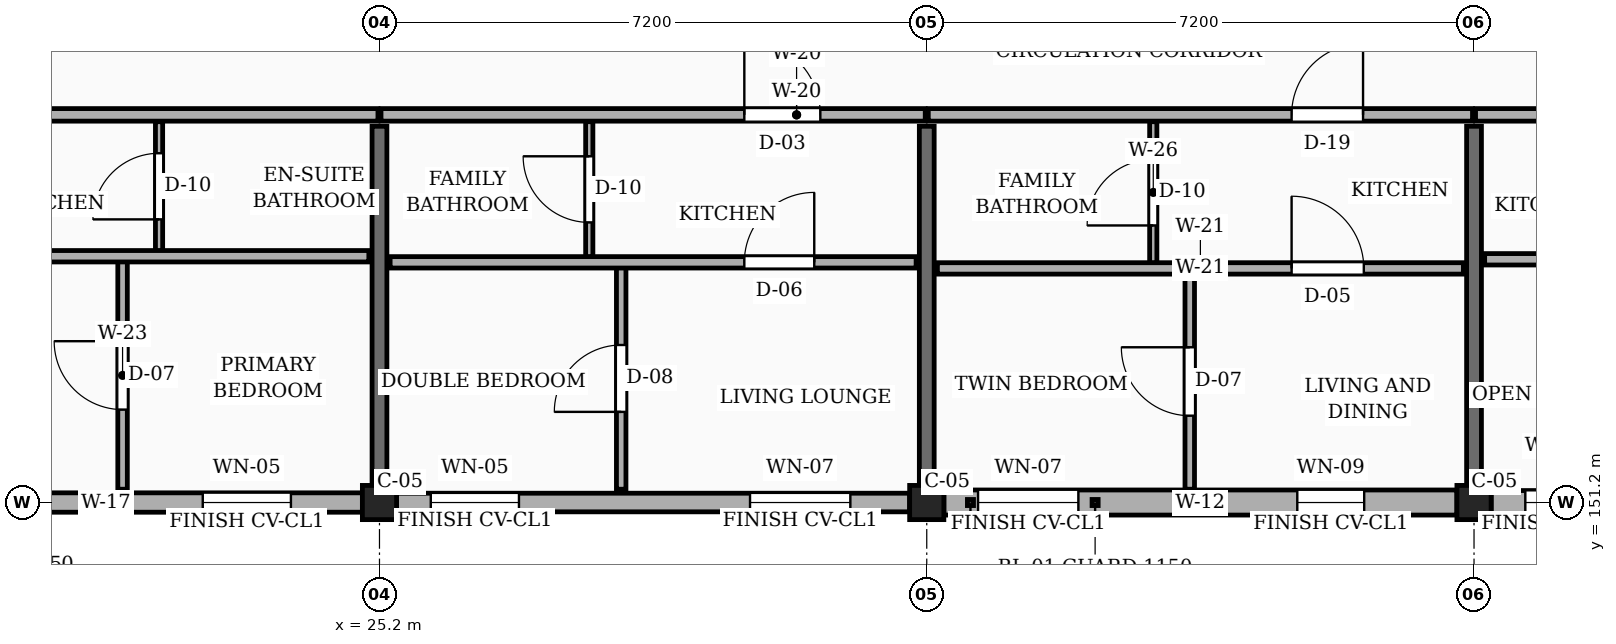
"""IFC4 building model, lengths in metres.
Left out: names, types, materials, properties, quantities, classifications, styles, units other than length and angle.
Written with IfcOpenShell. Run it as: python <this file> out.ifc"""

import sys

from ifc_helpers import new_model, si_unit, direction, frame, frame_2d, origin, origin_2d, place, context, subcontext, project, spatial, rectangle, extrude, element, fill, save


model = new_model("IFC4")
c1 = context("Model", 3, precision=1e-05, world=origin(), true_north=direction((0.0, 1.0)))
c2 = subcontext(c1, "Body", "Model", "MODEL_VIEW")
j1 = project(units=[si_unit("LENGTHUNIT", "METRE"), si_unit("PLANEANGLEUNIT", "RADIAN")], contexts=[c1])
p1 = place(None, origin())
s1 = spatial("IfcSite", under=j1, at=p1, CompositionType="ELEMENT")
p2 = place(p1, origin())
s2 = spatial("IfcBuilding", under=s1, at=p2, CompositionType="ELEMENT")
p3 = place(p2, frame((0.0, 0.0, 39.15)))
s3 = spatial("IfcBuildingStorey", under=s2, at=p3, CompositionType="ELEMENT", Elevation=39.15)
for number, where, z_axis, x_axis in (
    (1, (25.2, 151.2, 0.0), (0.0, 0.0, 1.0), (1.0, 0.0, 0.0)),
    (2, (32.4, 151.2, 0.0), (0.0, 0.0, 1.0), (1.0, 0.0, 0.0)),
    (3, (39.6, 151.2, 0.0), (0.0, 0.0, 1.0), (1.0, 0.0, 0.0)),
):
    element("IfcColumn", number, at=place(p3, frame(where, z_axis=z_axis, x_axis=x_axis)), inside=s3, PredefinedType="COLUMN", context=c2, shape_type="SweptSolid", body=[
        extrude(rectangle(XDim=0.45, YDim=0.45, at=origin_2d()), origin(), (0.0, 0.0, 1.0), 3.15),
    ])
for number, where, z_axis, x_axis in (
    (4, (25.2, 151.425, 0.0), (0.0, 0.0, 1.0), (0.0, 1.0, 0.0)),
    (5, (32.4, 151.425, 0.0), (0.0, 0.0, 1.0), (0.0, 1.0, 0.0)),
    (6, (39.6, 151.425, 0.0), (0.0, 0.0, 1.0), (0.0, 1.0, 0.0)),
):
    element("IfcWall", number, at=place(p3, frame(where, z_axis=z_axis, x_axis=x_axis)), inside=s3, PredefinedType="SOLIDWALL", context=c2, shape_type="SweptSolid", body=[
        extrude(rectangle(XDim=4.725, YDim=0.195, at=frame_2d((2.362, 0.0))), origin(), (0.0, 0.0, 1.0), 2.185),
    ])
p4 = place(p3, frame((18.225, 151.2, 0.0), z_axis=(0.0, 0.0, 1.0), x_axis=(1.0, 0.0, 0.0)))
e7 = element("IfcWall", 7, at=p4, inside=s3, PredefinedType="SOLIDWALL", context=c2, shape_type="SweptSolid", body=[
    extrude(rectangle(XDim=6.75, YDim=0.255, at=frame_2d((3.375, 0.0))), origin(), (0.0, 0.0, 1.0), 2.455),
])
p5 = place(p4, frame((0.45, 0.0, 0.78)))
e8 = element("IfcOpeningElement", 8, at=p5, cuts=e7, PredefinedType="OPENING", context=c2, shape_type="SweptSolid", body=[
    extrude(rectangle(XDim=1.0, YDim=1.15, at=frame_2d((0.5, 0.575))), frame((0.0, 0.137, 0.0), z_axis=(0.0, -1.0, 0.0), x_axis=(1.0, 0.0, 0.0)), (0.0, 0.0, 1.0), 0.275),
])
p6 = place(p4, frame((4.65, 0.0, 0.78)))
e9 = element("IfcOpeningElement", 9, at=p6, cuts=e7, PredefinedType="OPENING", context=c2, shape_type="SweptSolid", body=[
    extrude(rectangle(XDim=1.16, YDim=1.15, at=frame_2d((0.58, 0.575))), frame((0.0, 0.137, 0.0), z_axis=(0.0, -1.0, 0.0), x_axis=(1.0, 0.0, 0.0)), (0.0, 0.0, 1.0), 0.275),
])
p7 = place(p3, frame((25.425, 151.2, 0.0), z_axis=(0.0, 0.0, 1.0), x_axis=(1.0, 0.0, 0.0)))
e10 = element("IfcWall", 10, at=p7, inside=s3, PredefinedType="SOLIDWALL", context=c2, shape_type="SweptSolid", body=[
    extrude(rectangle(XDim=6.75, YDim=0.245, at=frame_2d((3.375, 0.0))), origin(), (0.0, 0.0, 1.0), 2.455),
])
p8 = place(p7, frame((0.45, 0.0, 0.78)))
e11 = element("IfcOpeningElement", 11, at=p8, cuts=e10, PredefinedType="OPENING", context=c2, shape_type="SweptSolid", body=[
    extrude(rectangle(XDim=1.16, YDim=1.15, at=frame_2d((0.58, 0.575))), frame((0.0, 0.133, 0.0), z_axis=(0.0, -1.0, 0.0), x_axis=(1.0, 0.0, 0.0)), (0.0, 0.0, 1.0), 0.265),
])
p9 = place(p7, frame((4.65, 0.0, 0.78)))
e12 = element("IfcOpeningElement", 12, at=p9, cuts=e10, PredefinedType="OPENING", context=c2, shape_type="SweptSolid", body=[
    extrude(rectangle(XDim=1.32, YDim=1.15, at=frame_2d((0.66, 0.575))), frame((0.0, 0.133, 0.0), z_axis=(0.0, -1.0, 0.0), x_axis=(1.0, 0.0, 0.0)), (0.0, 0.0, 1.0), 0.265),
])
p10 = place(p3, frame((32.625, 151.2, 0.0), z_axis=(0.0, 0.0, 1.0), x_axis=(1.0, 0.0, 0.0)))
e13 = element("IfcWall", 13, at=p10, inside=s3, PredefinedType="SOLIDWALL", context=c2, shape_type="SweptSolid", body=[
    extrude(rectangle(XDim=6.75, YDim=0.33, at=frame_2d((3.375, 0.0))), origin(), (0.0, 0.0, 1.0), 2.455),
])
p11 = place(p10, frame((0.45, 0.0, 0.78)))
e14 = element("IfcOpeningElement", 14, at=p11, cuts=e13, PredefinedType="OPENING", context=c2, shape_type="SweptSolid", body=[
    extrude(rectangle(XDim=1.32, YDim=1.15, at=frame_2d((0.66, 0.575))), frame((0.0, 0.175, 0.0), z_axis=(0.0, -1.0, 0.0), x_axis=(1.0, 0.0, 0.0)), (0.0, 0.0, 1.0), 0.35),
])
p12 = place(p10, frame((4.65, 0.0, 0.78)))
e15 = element("IfcOpeningElement", 15, at=p12, cuts=e13, PredefinedType="OPENING", context=c2, shape_type="SweptSolid", body=[
    extrude(rectangle(XDim=0.88, YDim=1.26, at=frame_2d((0.44, 0.63))), frame((0.0, 0.175, 0.0), z_axis=(0.0, -1.0, 0.0), x_axis=(1.0, 0.0, 0.0)), (0.0, 0.0, 1.0), 0.35),
])
p13 = place(p3, frame((39.825, 151.2, 0.0), z_axis=(0.0, 0.0, 1.0), x_axis=(1.0, 0.0, 0.0)))
e16 = element("IfcWall", 16, at=p13, inside=s3, PredefinedType="SOLIDWALL", context=c2, shape_type="SweptSolid", body=[
    extrude(rectangle(XDim=6.75, YDim=0.315, at=frame_2d((3.375, 0.0))), origin(), (0.0, 0.0, 1.0), 2.455),
])
p14 = place(p13, frame((0.45, 0.0, 0.78)))
e17 = element("IfcOpeningElement", 17, at=p14, cuts=e16, PredefinedType="OPENING", context=c2, shape_type="SweptSolid", body=[
    extrude(rectangle(XDim=0.88, YDim=1.26, at=frame_2d((0.44, 0.63))), frame((0.0, 0.167, 0.0), z_axis=(0.0, -1.0, 0.0), x_axis=(1.0, 0.0, 0.0)), (0.0, 0.0, 1.0), 0.335),
])
p15 = place(p13, frame((4.65, 0.0, 0.78)))
e18 = element("IfcOpeningElement", 18, at=p15, cuts=e16, PredefinedType="OPENING", context=c2, shape_type="SweptSolid", body=[
    extrude(rectangle(XDim=1.04, YDim=1.26, at=frame_2d((0.52, 0.63))), frame((0.0, 0.167, 0.0), z_axis=(0.0, -1.0, 0.0), x_axis=(1.0, 0.0, 0.0)), (0.0, 0.0, 1.0), 0.335),
])
p16 = place(p3, frame((18.175, 156.3, 0.0), z_axis=(0.0, 0.0, 1.0), x_axis=(1.0, 0.0, 0.0)))
e19 = element("IfcWall", 19, at=p16, inside=s3, PredefinedType="PARTITIONING", context=c2, shape_type="SweptSolid", body=[
    extrude(rectangle(XDim=7.005, YDim=0.165, at=frame_2d((3.502, 0.0))), origin(), (0.0, 0.0, 1.0), 2.32),
])
p17 = place(p16, frame((1.175, 0.0, 0.0)))
e20 = element("IfcOpeningElement", 20, at=p17, cuts=e19, PredefinedType="OPENING", context=c2, shape_type="SweptSolid", body=[
    extrude(rectangle(XDim=1.14, YDim=2.18, at=frame_2d((0.57, 1.09))), frame((0.0, 0.093, 0.0), z_axis=(0.0, -1.0, 0.0), x_axis=(1.0, 0.0, 0.0)), (0.0, 0.0, 1.0), 0.185),
])
p18 = place(p3, frame((25.22, 156.3, 0.0), z_axis=(0.0, 0.0, 1.0), x_axis=(1.0, 0.0, 0.0)))
e21 = element("IfcWall", 21, at=p18, inside=s3, PredefinedType="PARTITIONING", context=c2, shape_type="SweptSolid", body=[
    extrude(rectangle(XDim=7.16, YDim=0.165, at=frame_2d((3.58, 0.0))), origin(), (0.0, 0.0, 1.0), 2.32),
])
p19 = place(p18, frame((4.78, 0.0, 0.0)))
e22 = element("IfcOpeningElement", 22, at=p19, cuts=e21, PredefinedType="OPENING", context=c2, shape_type="SweptSolid", body=[
    extrude(rectangle(XDim=1.0, YDim=2.15, at=frame_2d((0.5, 1.075))), frame((0.0, 0.093, 0.0), z_axis=(0.0, -1.0, 0.0), x_axis=(1.0, 0.0, 0.0)), (0.0, 0.0, 1.0), 0.185),
])
p20 = place(p3, frame((32.42, 156.3, 0.0), z_axis=(0.0, 0.0, 1.0), x_axis=(1.0, 0.0, 0.0)))
e23 = element("IfcWall", 23, at=p20, inside=s3, PredefinedType="PARTITIONING", context=c2, shape_type="SweptSolid", body=[
    extrude(rectangle(XDim=7.16, YDim=0.165, at=frame_2d((3.58, 0.0))), origin(), (0.0, 0.0, 1.0), 2.32),
])
p21 = place(p20, frame((4.78, 0.0, 0.0)))
e24 = element("IfcOpeningElement", 24, at=p21, cuts=e23, PredefinedType="OPENING", context=c2, shape_type="SweptSolid", body=[
    extrude(rectangle(XDim=0.94, YDim=2.12, at=frame_2d((0.47, 1.06))), frame((0.0, 0.093, 0.0), z_axis=(0.0, -1.0, 0.0), x_axis=(1.0, 0.0, 0.0)), (0.0, 0.0, 1.0), 0.185),
])
p22 = place(p3, frame((39.62, 156.3, 0.0), z_axis=(0.0, 0.0, 1.0), x_axis=(1.0, 0.0, 0.0)))
e25 = element("IfcWall", 25, at=p22, inside=s3, PredefinedType="PARTITIONING", context=c2, shape_type="SweptSolid", body=[
    extrude(rectangle(XDim=7.16, YDim=0.165, at=frame_2d((3.58, 0.0))), origin(), (0.0, 0.0, 1.0), 2.32),
])
p23 = place(p22, frame((1.33, 0.0, 0.0)))
e26 = element("IfcOpeningElement", 26, at=p23, cuts=e25, PredefinedType="OPENING", context=c2, shape_type="SweptSolid", body=[
    extrude(rectangle(XDim=1.14, YDim=2.18, at=frame_2d((0.57, 1.09))), frame((0.0, 0.093, 0.0), z_axis=(0.0, -1.0, 0.0), x_axis=(1.0, 0.0, 0.0)), (0.0, 0.0, 1.0), 0.185),
])
p24 = place(p3, frame((21.82, 151.375, 0.0), z_axis=(0.0, 0.0, 1.0), x_axis=(0.0, 1.0, 0.0)))
e27 = element("IfcWall", 27, at=p24, inside=s3, PredefinedType="PARTITIONING", context=c2, shape_type="SweptSolid", body=[
    extrude(rectangle(XDim=2.995, YDim=0.125, at=frame_2d((1.498, 0.0))), origin(), (0.0, 0.0, 1.0), 2.32),
])
p25 = place(p24, frame((1.048, 0.0, 0.0)))
e28 = element("IfcOpeningElement", 28, at=p25, cuts=e27, PredefinedType="OPENING", context=c2, shape_type="SweptSolid", body=[
    extrude(rectangle(XDim=0.9, YDim=2.1, at=frame_2d((0.45, 1.05))), frame((0.0, 0.073, 0.0), z_axis=(0.0, -1.0, 0.0), x_axis=(1.0, 0.0, 0.0)), (0.0, 0.0, 1.0), 0.145),
])
p26 = place(p3, frame((22.3, 154.51, 0.0), z_axis=(0.0, 0.0, 1.0), x_axis=(0.0, 1.0, 0.0)))
e29 = element("IfcWall", 29, at=p26, inside=s3, PredefinedType="PARTITIONING", context=c2, shape_type="SweptSolid", body=[
    extrude(rectangle(XDim=1.7, YDim=0.095, at=frame_2d((0.85, 0.0))), origin(), (0.0, 0.0, 1.0), 2.32),
])
p27 = place(p26, frame((0.415, 0.0, 0.0)))
e30 = element("IfcOpeningElement", 30, at=p27, cuts=e29, PredefinedType="OPENING", context=c2, shape_type="SweptSolid", body=[
    extrude(rectangle(XDim=0.87, YDim=2.05, at=frame_2d((0.435, 1.025))), frame((0.0, 0.058, 0.0), z_axis=(0.0, -1.0, 0.0), x_axis=(1.0, 0.0, 0.0)), (0.0, 0.0, 1.0), 0.115),
])
p28 = place(p3, frame((18.175, 154.44, 0.0), z_axis=(0.0, 0.0, 1.0), x_axis=(1.0, 0.0, 0.0)))
e31 = element("IfcWall", 31, at=p28, inside=s3, PredefinedType="PARTITIONING", context=c2, shape_type="SweptSolid", body=[
    extrude(rectangle(XDim=6.885, YDim=0.15, at=frame_2d((3.442, 0.0))), origin(), (0.0, 0.0, 1.0), 2.32),
])
p29 = place(p28, frame((1.275, 0.0, 0.0)))
e32 = element("IfcOpeningElement", 32, at=p29, cuts=e31, PredefinedType="OPENING", context=c2, shape_type="SweptSolid", body=[
    extrude(rectangle(XDim=0.95, YDim=2.1, at=frame_2d((0.475, 1.05))), frame((0.0, 0.085, 0.0), z_axis=(0.0, -1.0, 0.0), x_axis=(1.0, 0.0, 0.0)), (0.0, 0.0, 1.0), 0.17),
])
p30 = place(p3, frame((28.38, 151.375, 0.0), z_axis=(0.0, 0.0, 1.0), x_axis=(0.0, 1.0, 0.0)))
e33 = element("IfcWall", 33, at=p30, inside=s3, PredefinedType="PARTITIONING", context=c2, shape_type="SweptSolid", body=[
    extrude(rectangle(XDim=2.915, YDim=0.125, at=frame_2d((1.458, 0.0))), origin(), (0.0, 0.0, 1.0), 2.32),
])
p31 = place(p30, frame((1.018, 0.0, 0.0)))
e34 = element("IfcOpeningElement", 34, at=p31, cuts=e33, PredefinedType="OPENING", context=c2, shape_type="SweptSolid", body=[
    extrude(rectangle(XDim=0.88, YDim=2.08, at=frame_2d((0.44, 1.04))), frame((0.0, 0.073, 0.0), z_axis=(0.0, -1.0, 0.0), x_axis=(1.0, 0.0, 0.0)), (0.0, 0.0, 1.0), 0.145),
])
p32 = place(p3, frame((27.96, 154.43, 0.0), z_axis=(0.0, 0.0, 1.0), x_axis=(0.0, 1.0, 0.0)))
e35 = element("IfcWall", 35, at=p32, inside=s3, PredefinedType="PARTITIONING", context=c2, shape_type="SweptSolid", body=[
    extrude(rectangle(XDim=1.78, YDim=0.095, at=frame_2d((0.89, 0.0))), origin(), (0.0, 0.0, 1.0), 2.32),
])
p33 = place(p32, frame((0.455, 0.0, 0.0)))
e36 = element("IfcOpeningElement", 36, at=p33, cuts=e35, PredefinedType="OPENING", context=c2, shape_type="SweptSolid", body=[
    extrude(rectangle(XDim=0.87, YDim=2.05, at=frame_2d((0.435, 1.025))), frame((0.0, 0.058, 0.0), z_axis=(0.0, -1.0, 0.0), x_axis=(1.0, 0.0, 0.0)), (0.0, 0.0, 1.0), 0.115),
])
p34 = place(p3, frame((25.34, 154.36, 0.0), z_axis=(0.0, 0.0, 1.0), x_axis=(1.0, 0.0, 0.0)))
e37 = element("IfcWall", 37, at=p34, inside=s3, PredefinedType="PARTITIONING", context=c2, shape_type="SweptSolid", body=[
    extrude(rectangle(XDim=6.92, YDim=0.15, at=frame_2d((3.46, 0.0))), origin(), (0.0, 0.0, 1.0), 2.32),
])
p35 = place(p34, frame((4.66, 0.0, 0.0)))
e38 = element("IfcOpeningElement", 38, at=p35, cuts=e37, PredefinedType="OPENING", context=c2, shape_type="SweptSolid", body=[
    extrude(rectangle(XDim=0.92, YDim=2.1, at=frame_2d((0.46, 1.05))), frame((0.0, 0.085, 0.0), z_axis=(0.0, -1.0, 0.0), x_axis=(1.0, 0.0, 0.0)), (0.0, 0.0, 1.0), 0.17),
])
p36 = place(p3, frame((35.86, 151.375, 0.0), z_axis=(0.0, 0.0, 1.0), x_axis=(0.0, 1.0, 0.0)))
e39 = element("IfcWall", 39, at=p36, inside=s3, PredefinedType="PARTITIONING", context=c2, shape_type="SweptSolid", body=[
    extrude(rectangle(XDim=2.835, YDim=0.125, at=frame_2d((1.417, 0.0))), origin(), (0.0, 0.0, 1.0), 2.32),
])
p37 = place(p36, frame((0.968, 0.0, 0.0)))
e40 = element("IfcOpeningElement", 40, at=p37, cuts=e39, PredefinedType="OPENING", context=c2, shape_type="SweptSolid", body=[
    extrude(rectangle(XDim=0.9, YDim=2.1, at=frame_2d((0.45, 1.05))), frame((0.0, 0.073, 0.0), z_axis=(0.0, -1.0, 0.0), x_axis=(1.0, 0.0, 0.0)), (0.0, 0.0, 1.0), 0.145),
])
p38 = place(p3, frame((35.38, 154.35, 0.0), z_axis=(0.0, 0.0, 1.0), x_axis=(0.0, 1.0, 0.0)))
e41 = element("IfcWall", 41, at=p38, inside=s3, PredefinedType="PARTITIONING", context=c2, shape_type="SweptSolid", body=[
    extrude(rectangle(XDim=1.86, YDim=0.095, at=frame_2d((0.93, 0.0))), origin(), (0.0, 0.0, 1.0), 2.32),
])
p39 = place(p38, frame((0.495, 0.0, 0.0)))
e42 = element("IfcOpeningElement", 42, at=p39, cuts=e41, PredefinedType="OPENING", context=c2, shape_type="SweptSolid", body=[
    extrude(rectangle(XDim=0.87, YDim=2.05, at=frame_2d((0.435, 1.025))), frame((0.0, 0.058, 0.0), z_axis=(0.0, -1.0, 0.0), x_axis=(1.0, 0.0, 0.0)), (0.0, 0.0, 1.0), 0.115),
])
p40 = place(p3, frame((32.54, 154.28, 0.0), z_axis=(0.0, 0.0, 1.0), x_axis=(1.0, 0.0, 0.0)))
e43 = element("IfcWall", 43, at=p40, inside=s3, PredefinedType="PARTITIONING", context=c2, shape_type="SweptSolid", body=[
    extrude(rectangle(XDim=6.92, YDim=0.15, at=frame_2d((3.46, 0.0))), origin(), (0.0, 0.0, 1.0), 2.32),
])
p41 = place(p40, frame((4.66, 0.0, 0.0)))
e44 = element("IfcOpeningElement", 44, at=p41, cuts=e43, PredefinedType="OPENING", context=c2, shape_type="SweptSolid", body=[
    extrude(rectangle(XDim=0.95, YDim=2.1, at=frame_2d((0.475, 1.05))), frame((0.0, 0.085, 0.0), z_axis=(0.0, -1.0, 0.0), x_axis=(1.0, 0.0, 0.0)), (0.0, 0.0, 1.0), 0.17),
])
p42 = place(p3, frame((39.74, 154.4, 0.0), z_axis=(0.0, 0.0, 1.0), x_axis=(1.0, 0.0, 0.0)))
e45 = element("IfcWall", 45, at=p42, inside=s3, PredefinedType="PARTITIONING", context=c2, shape_type="SweptSolid", body=[
    extrude(rectangle(XDim=6.92, YDim=0.15, at=frame_2d((3.46, 0.0))), origin(), (0.0, 0.0, 1.0), 2.32),
])
p43 = place(p42, frame((1.31, 0.0, 0.0)))
e46 = element("IfcOpeningElement", 46, at=p43, cuts=e45, PredefinedType="OPENING", context=c2, shape_type="SweptSolid", body=[
    extrude(rectangle(XDim=0.92, YDim=2.1, at=frame_2d((0.46, 1.05))), frame((0.0, 0.085, 0.0), z_axis=(0.0, -1.0, 0.0), x_axis=(1.0, 0.0, 0.0)), (0.0, 0.0, 1.0), 0.17),
])
p44 = place(p6, origin())
e47 = element("IfcWindow", 47, at=p44, inside=s3, PartitioningType="SINGLE_PANEL", PredefinedType="WINDOW", context=c2, shape_type="SweptSolid", body=[
    extrude(rectangle(XDim=1.16, YDim=1.15, at=frame_2d((0.58, 0.575))), frame((0.0, 0.03, 0.0), z_axis=(0.0, -1.0, 0.0), x_axis=(1.0, 0.0, 0.0)), (0.0, 0.0, 1.0), 0.06),
])
fill(e9, e47)
p45 = place(p8, origin())
e48 = element("IfcWindow", 48, at=p45, inside=s3, PartitioningType="SINGLE_PANEL", PredefinedType="WINDOW", context=c2, shape_type="SweptSolid", body=[
    extrude(rectangle(XDim=1.16, YDim=1.15, at=frame_2d((0.58, 0.575))), frame((0.0, 0.03, 0.0), z_axis=(0.0, -1.0, 0.0), x_axis=(1.0, 0.0, 0.0)), (0.0, 0.0, 1.0), 0.06),
])
fill(e11, e48)
p46 = place(p9, origin())
e49 = element("IfcWindow", 49, at=p46, inside=s3, PartitioningType="SINGLE_PANEL", PredefinedType="WINDOW", context=c2, shape_type="SweptSolid", body=[
    extrude(rectangle(XDim=1.32, YDim=1.15, at=frame_2d((0.66, 0.575))), frame((0.0, 0.03, 0.0), z_axis=(0.0, -1.0, 0.0), x_axis=(1.0, 0.0, 0.0)), (0.0, 0.0, 1.0), 0.06),
])
fill(e12, e49)
p47 = place(p11, origin())
e50 = element("IfcWindow", 50, at=p47, inside=s3, PartitioningType="SINGLE_PANEL", PredefinedType="WINDOW", context=c2, shape_type="SweptSolid", body=[
    extrude(rectangle(XDim=1.32, YDim=1.15, at=frame_2d((0.66, 0.575))), frame((0.0, 0.03, 0.0), z_axis=(0.0, -1.0, 0.0), x_axis=(1.0, 0.0, 0.0)), (0.0, 0.0, 1.0), 0.06),
])
fill(e14, e50)
p48 = place(p12, origin())
e51 = element("IfcWindow", 51, at=p48, inside=s3, PartitioningType="SINGLE_PANEL", PredefinedType="WINDOW", context=c2, shape_type="SweptSolid", body=[
    extrude(rectangle(XDim=0.88, YDim=1.26, at=frame_2d((0.44, 0.63))), frame((0.0, 0.03, 0.0), z_axis=(0.0, -1.0, 0.0), x_axis=(1.0, 0.0, 0.0)), (0.0, 0.0, 1.0), 0.06),
])
fill(e15, e51)
p49 = place(p14, origin())
e52 = element("IfcWindow", 52, at=p49, inside=s3, PartitioningType="SINGLE_PANEL", PredefinedType="WINDOW", context=c2, shape_type="SweptSolid", body=[
    extrude(rectangle(XDim=0.88, YDim=1.26, at=frame_2d((0.44, 0.63))), frame((0.0, 0.03, 0.0), z_axis=(0.0, -1.0, 0.0), x_axis=(1.0, 0.0, 0.0)), (0.0, 0.0, 1.0), 0.06),
])
fill(e17, e52)
p50 = place(p19, origin())
e53 = element("IfcDoor", 53, at=p50, inside=s3, OperationType="SINGLE_SWING_LEFT", PredefinedType="DOOR", context=c2, shape_type="SweptSolid", body=[
    extrude(rectangle(XDim=1.0, YDim=2.15, at=frame_2d((0.5, 1.075))), frame((0.0, 0.025, 0.0), z_axis=(0.0, -1.0, 0.0), x_axis=(1.0, 0.0, 0.0)), (0.0, 0.0, 1.0), 0.05),
])
fill(e22, e53)
p51 = place(p21, origin())
e54 = element("IfcDoor", 54, at=p51, inside=s3, OperationType="SINGLE_SWING_RIGHT", PredefinedType="DOOR", context=c2, shape_type="SweptSolid", body=[
    extrude(rectangle(XDim=0.94, YDim=2.12, at=frame_2d((0.47, 1.06))), frame((0.0, 0.025, 0.0), z_axis=(0.0, -1.0, 0.0), x_axis=(1.0, 0.0, 0.0)), (0.0, 0.0, 1.0), 0.05),
])
fill(e24, e54)
p52 = place(p25, origin())
e55 = element("IfcDoor", 55, at=p52, inside=s3, OperationType="SINGLE_SWING_RIGHT", PredefinedType="DOOR", context=c2, shape_type="SweptSolid", body=[
    extrude(rectangle(XDim=0.9, YDim=2.1, at=frame_2d((0.45, 1.05))), frame((0.0, 0.025, 0.0), z_axis=(0.0, -1.0, 0.0), x_axis=(1.0, 0.0, 0.0)), (0.0, 0.0, 1.0), 0.05),
])
fill(e28, e55)
p53 = place(p27, origin())
e56 = element("IfcDoor", 56, at=p53, inside=s3, OperationType="SINGLE_SWING_LEFT", PredefinedType="DOOR", context=c2, shape_type="SweptSolid", body=[
    extrude(rectangle(XDim=0.87, YDim=2.05, at=frame_2d((0.435, 1.025))), frame((0.0, 0.025, 0.0), z_axis=(0.0, -1.0, 0.0), x_axis=(1.0, 0.0, 0.0)), (0.0, 0.0, 1.0), 0.05),
])
fill(e30, e56)
p54 = place(p31, origin())
e57 = element("IfcDoor", 57, at=p54, inside=s3, OperationType="SINGLE_SWING_LEFT", PredefinedType="DOOR", context=c2, shape_type="SweptSolid", body=[
    extrude(rectangle(XDim=0.88, YDim=2.08, at=frame_2d((0.44, 1.04))), frame((0.0, 0.025, 0.0), z_axis=(0.0, -1.0, 0.0), x_axis=(1.0, 0.0, 0.0)), (0.0, 0.0, 1.0), 0.05),
])
fill(e34, e57)
p55 = place(p33, origin())
e58 = element("IfcDoor", 58, at=p55, inside=s3, OperationType="SINGLE_SWING_RIGHT", PredefinedType="DOOR", context=c2, shape_type="SweptSolid", body=[
    extrude(rectangle(XDim=0.87, YDim=2.05, at=frame_2d((0.435, 1.025))), frame((0.0, 0.025, 0.0), z_axis=(0.0, -1.0, 0.0), x_axis=(1.0, 0.0, 0.0)), (0.0, 0.0, 1.0), 0.05),
])
fill(e36, e58)
p56 = place(p35, origin())
e59 = element("IfcDoor", 59, at=p56, inside=s3, OperationType="SINGLE_SWING_RIGHT", PredefinedType="DOOR", context=c2, shape_type="SweptSolid", body=[
    extrude(rectangle(XDim=0.92, YDim=2.1, at=frame_2d((0.46, 1.05))), frame((0.0, 0.025, 0.0), z_axis=(0.0, -1.0, 0.0), x_axis=(1.0, 0.0, 0.0)), (0.0, 0.0, 1.0), 0.05),
])
fill(e38, e59)
p57 = place(p37, origin())
e60 = element("IfcDoor", 60, at=p57, inside=s3, OperationType="SINGLE_SWING_RIGHT", PredefinedType="DOOR", context=c2, shape_type="SweptSolid", body=[
    extrude(rectangle(XDim=0.9, YDim=2.1, at=frame_2d((0.45, 1.05))), frame((0.0, 0.025, 0.0), z_axis=(0.0, -1.0, 0.0), x_axis=(1.0, 0.0, 0.0)), (0.0, 0.0, 1.0), 0.05),
])
fill(e40, e60)
p58 = place(p39, origin())
e61 = element("IfcDoor", 61, at=p58, inside=s3, OperationType="SINGLE_SWING_LEFT", PredefinedType="DOOR", context=c2, shape_type="SweptSolid", body=[
    extrude(rectangle(XDim=0.87, YDim=2.05, at=frame_2d((0.435, 1.025))), frame((0.0, 0.025, 0.0), z_axis=(0.0, -1.0, 0.0), x_axis=(1.0, 0.0, 0.0)), (0.0, 0.0, 1.0), 0.05),
])
fill(e42, e61)
p59 = place(p41, origin())
e62 = element("IfcDoor", 62, at=p59, inside=s3, OperationType="SINGLE_SWING_LEFT", PredefinedType="DOOR", context=c2, shape_type="SweptSolid", body=[
    extrude(rectangle(XDim=0.95, YDim=2.1, at=frame_2d((0.475, 1.05))), frame((0.0, 0.025, 0.0), z_axis=(0.0, -1.0, 0.0), x_axis=(1.0, 0.0, 0.0)), (0.0, 0.0, 1.0), 0.05),
])
fill(e44, e62)
save(model, sys.argv[1])
